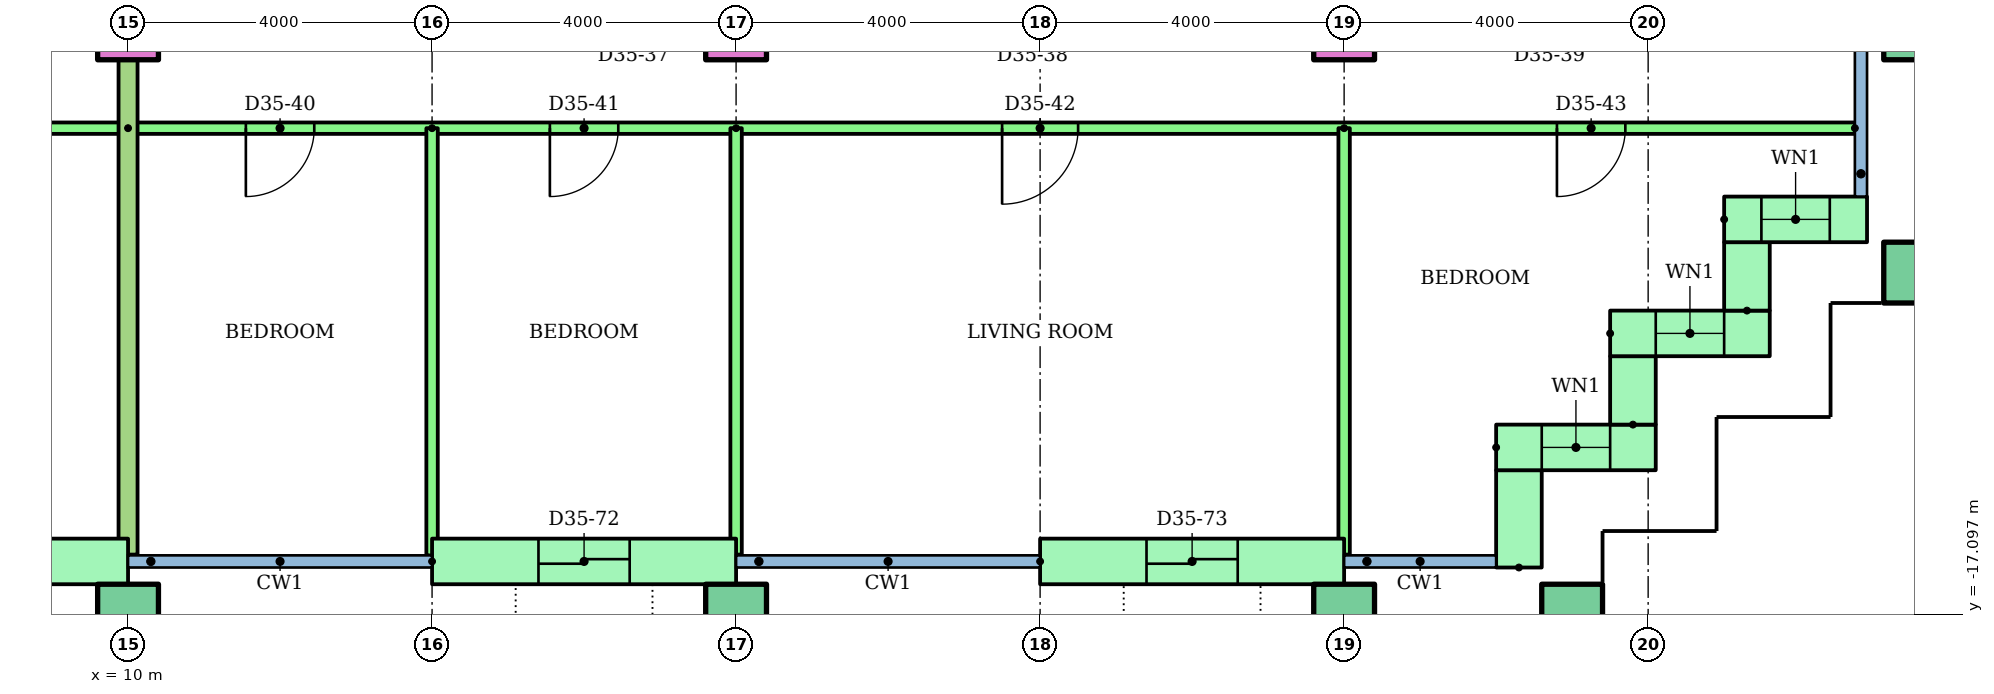
"""IFC4 building model, lengths in metres.
Left out: names, types, materials, properties, quantities, classifications, styles, units other than length and angle.
Written with IfcOpenShell. Run it as: python <this file> out.ifc"""

import sys

from ifc_helpers import new_model, si_unit, direction, frame, frame_2d, origin, origin_2d, place, context, subcontext, project, spatial, rectangle, hollow_rectangle, extrude, element, fill, save


model = new_model("IFC4")
c1 = context("Model", 3, precision=1e-05, world=origin(), true_north=direction((0.0, 1.0)))
c2 = subcontext(c1, "Body", "Model", "MODEL_VIEW")
j1 = project(units=[si_unit("LENGTHUNIT", "METRE"), si_unit("PLANEANGLEUNIT", "RADIAN")], contexts=[c1])
p1 = place(None, origin())
s1 = spatial("IfcSite", under=j1, at=p1, CompositionType="ELEMENT")
p2 = place(p1, origin())
s2 = spatial("IfcBuilding", under=s1, at=p2, CompositionType="ELEMENT")
p3 = place(p2, frame((0.0, 0.0, 135.8)))
s3 = spatial("IfcBuildingStorey", under=s2, at=p3, CompositionType="ELEMENT", Elevation=135.8)
for number, where in (
    (1, (10.0, -17.1, 0.0)),
    (2, (18.0, -17.1, 0.0)),
    (3, (26.0, -17.1, 0.0)),
    (4, (29.0, -17.1, 0.0)),
    (5, (33.5, -12.6, 0.0)),
):
    element("IfcColumn", number, at=place(p3, frame(where)), inside=s3, PredefinedType="COLUMN", context=c2, shape_type="SweptSolid", body=[
        extrude(hollow_rectangle(XDim=0.8, YDim=0.8, WallThickness=0.04, at=origin_2d()), origin(), (0.0, 0.0, 1.0), 3.2),
    ])
for number, where in (
    (6, (10.0, -9.4, 0.0)),
    (7, (18.0, -9.4, 0.0)),
    (8, (26.0, -9.4, 0.0)),
):
    element("IfcColumn", number, at=place(p3, frame(where)), inside=s3, PredefinedType="COLUMN", context=c2, shape_type="SweptSolid", body=[
        extrude(rectangle(XDim=0.8, YDim=0.8, at=origin_2d()), origin(), (0.0, 0.0, 1.0), 3.2),
    ])
p4 = place(p3, frame((33.5, -9.4, 0.0)))
e9 = element("IfcColumn", 9, at=p4, inside=s3, PredefinedType="COLUMN", context=c2, shape_type="SweptSolid", body=[
    extrude(hollow_rectangle(XDim=0.8, YDim=0.8, WallThickness=0.04, at=origin_2d()), origin(), (0.0, 0.0, 1.0), 3.2),
])
p5 = place(p3, frame((6.0, -16.4, 0.0)))
e10 = element("IfcWall", 10, at=p5, inside=s3, PredefinedType="STANDARD", context=c2, shape_type="SweptSolid", body=[
    extrude(rectangle(XDim=4.0, YDim=0.6, at=frame_2d((2.0, 0.0))), origin(), (0.0, 0.0, 1.0), 2.92),
])
p6 = place(p5, frame((1.4, 0.0, 0.0)))
e11 = element("IfcOpeningElement", 11, at=p6, cuts=e10, PredefinedType="OPENING", context=c2, shape_type="SweptSolid", body=[
    extrude(rectangle(XDim=1.2, YDim=2.1, at=frame_2d((0.6, 1.05))), frame((0.0, 0.31, 0.0), z_axis=(0.0, -1.0, 0.0), x_axis=(1.0, 0.0, 0.0)), (0.0, 0.0, 1.0), 0.62),
])
p7 = place(p3, frame((14.0, -16.4, 0.0)))
e12 = element("IfcWall", 12, at=p7, inside=s3, PredefinedType="STANDARD", context=c2, shape_type="SweptSolid", body=[
    extrude(rectangle(XDim=4.0, YDim=0.6, at=frame_2d((2.0, 0.0))), origin(), (0.0, 0.0, 1.0), 2.92),
])
p8 = place(p7, frame((1.4, 0.0, 0.0)))
e13 = element("IfcOpeningElement", 13, at=p8, cuts=e12, PredefinedType="OPENING", context=c2, shape_type="SweptSolid", body=[
    extrude(rectangle(XDim=1.2, YDim=2.1, at=frame_2d((0.6, 1.05))), frame((0.0, 0.31, 0.0), z_axis=(0.0, -1.0, 0.0), x_axis=(1.0, 0.0, 0.0)), (0.0, 0.0, 1.0), 0.62),
])
p9 = place(p3, frame((22.0, -16.4, 0.0)))
e14 = element("IfcWall", 14, at=p9, inside=s3, PredefinedType="STANDARD", context=c2, shape_type="SweptSolid", body=[
    extrude(rectangle(XDim=4.0, YDim=0.6, at=frame_2d((2.0, 0.0))), origin(), (0.0, 0.0, 1.0), 2.92),
])
p10 = place(p9, frame((1.4, 0.0, 0.0)))
e15 = element("IfcOpeningElement", 15, at=p10, cuts=e14, PredefinedType="OPENING", context=c2, shape_type="SweptSolid", body=[
    extrude(rectangle(XDim=1.2, YDim=2.1, at=frame_2d((0.6, 1.05))), frame((0.0, 0.31, 0.0), z_axis=(0.0, -1.0, 0.0), x_axis=(1.0, 0.0, 0.0)), (0.0, 0.0, 1.0), 0.62),
])
p11 = place(p3, frame((28.3, -16.48, 0.0), z_axis=(0.0, 0.0, 1.0), x_axis=(0.0, 1.0, 0.0)))
e16 = element("IfcWall", 16, at=p11, inside=s3, PredefinedType="STANDARD", context=c2, shape_type="SweptSolid", body=[
    extrude(rectangle(XDim=1.28, YDim=0.6, at=frame_2d((0.64, 0.0))), origin(), (0.0, 0.0, 1.0), 2.92),
])
p12 = place(p3, frame((28.0, -14.9, 0.0)))
e17 = element("IfcWall", 17, at=p12, inside=s3, PredefinedType="STANDARD", context=c2, shape_type="SweptSolid", body=[
    extrude(rectangle(XDim=2.1, YDim=0.6, at=frame_2d((1.05, 0.0))), origin(), (0.0, 0.0, 1.0), 2.92),
])
p13 = place(p12, frame((0.6, 0.0, 0.9)))
e18 = element("IfcOpeningElement", 18, at=p13, cuts=e17, PredefinedType="OPENING", context=c2, shape_type="SweptSolid", body=[
    extrude(rectangle(XDim=0.9, YDim=1.5, at=frame_2d((0.45, 0.75))), frame((0.0, 0.31, 0.0), z_axis=(0.0, -1.0, 0.0), x_axis=(1.0, 0.0, 0.0)), (0.0, 0.0, 1.0), 0.62),
])
p14 = place(p3, frame((29.8, -14.6, 0.0), z_axis=(0.0, 0.0, 1.0), x_axis=(0.0, 1.0, 0.0)))
e19 = element("IfcWall", 19, at=p14, inside=s3, PredefinedType="STANDARD", context=c2, shape_type="SweptSolid", body=[
    extrude(rectangle(XDim=0.9, YDim=0.6, at=frame_2d((0.45, 0.0))), origin(), (0.0, 0.0, 1.0), 2.92),
])
p15 = place(p3, frame((29.5, -13.4, 0.0)))
e20 = element("IfcWall", 20, at=p15, inside=s3, PredefinedType="STANDARD", context=c2, shape_type="SweptSolid", body=[
    extrude(rectangle(XDim=2.1, YDim=0.6, at=frame_2d((1.05, 0.0))), origin(), (0.0, 0.0, 1.0), 2.92),
])
p16 = place(p15, frame((0.6, 0.0, 0.9)))
e21 = element("IfcOpeningElement", 21, at=p16, cuts=e20, PredefinedType="OPENING", context=c2, shape_type="SweptSolid", body=[
    extrude(rectangle(XDim=0.9, YDim=1.5, at=frame_2d((0.45, 0.75))), frame((0.0, 0.31, 0.0), z_axis=(0.0, -1.0, 0.0), x_axis=(1.0, 0.0, 0.0)), (0.0, 0.0, 1.0), 0.62),
])
p17 = place(p3, frame((31.3, -13.1, 0.0), z_axis=(0.0, 0.0, 1.0), x_axis=(0.0, 1.0, 0.0)))
e22 = element("IfcWall", 22, at=p17, inside=s3, PredefinedType="STANDARD", context=c2, shape_type="SweptSolid", body=[
    extrude(rectangle(XDim=0.9, YDim=0.6, at=frame_2d((0.45, 0.0))), origin(), (0.0, 0.0, 1.0), 2.92),
])
p18 = place(p3, frame((31.0, -11.9, 0.0)))
e23 = element("IfcWall", 23, at=p18, inside=s3, PredefinedType="STANDARD", context=c2, shape_type="SweptSolid", body=[
    extrude(rectangle(XDim=1.88, YDim=0.6, at=frame_2d((0.94, 0.0))), origin(), (0.0, 0.0, 1.0), 2.92),
])
p19 = place(p18, frame((0.49, 0.0, 0.9)))
e24 = element("IfcOpeningElement", 24, at=p19, cuts=e23, PredefinedType="OPENING", context=c2, shape_type="SweptSolid", body=[
    extrude(rectangle(XDim=0.9, YDim=1.5, at=frame_2d((0.45, 0.75))), frame((0.0, 0.31, 0.0), z_axis=(0.0, -1.0, 0.0), x_axis=(1.0, 0.0, 0.0)), (0.0, 0.0, 1.0), 0.62),
])
p20 = place(p3, frame((10.0, -10.7, 0.0), z_axis=(0.0, 0.0, 1.0), x_axis=(-1.0, 0.0, 0.0)))
e25 = element("IfcWall", 25, at=p20, inside=s3, PredefinedType="PARTITIONING", context=c2, shape_type="SweptSolid", body=[
    extrude(rectangle(XDim=16.0, YDim=0.15, at=frame_2d((8.0, 0.0))), origin(), (0.0, 0.0, 1.0), 2.4),
])
p21 = place(p20, frame((13.55, 0.0, 0.0)))
e26 = element("IfcOpeningElement", 26, at=p21, cuts=e25, PredefinedType="OPENING", context=c2, shape_type="SweptSolid", body=[
    extrude(rectangle(XDim=0.9, YDim=2.1, at=frame_2d((0.45, 1.05))), frame((0.0, 0.085, 0.0), z_axis=(0.0, -1.0, 0.0), x_axis=(1.0, 0.0, 0.0)), (0.0, 0.0, 1.0), 0.17),
])
p22 = place(p20, frame((9.55, 0.0, 0.0)))
e27 = element("IfcOpeningElement", 27, at=p22, cuts=e25, PredefinedType="OPENING", context=c2, shape_type="SweptSolid", body=[
    extrude(rectangle(XDim=0.9, YDim=2.1, at=frame_2d((0.45, 1.05))), frame((0.0, 0.085, 0.0), z_axis=(0.0, -1.0, 0.0), x_axis=(1.0, 0.0, 0.0)), (0.0, 0.0, 1.0), 0.17),
])
p23 = place(p20, frame((3.5, 0.0, 0.0)))
e28 = element("IfcOpeningElement", 28, at=p23, cuts=e25, PredefinedType="OPENING", context=c2, shape_type="SweptSolid", body=[
    extrude(rectangle(XDim=1.0, YDim=2.1, at=frame_2d((0.5, 1.05))), frame((0.0, 0.085, 0.0), z_axis=(0.0, -1.0, 0.0), x_axis=(1.0, 0.0, 0.0)), (0.0, 0.0, 1.0), 0.17),
])
p24 = place(p3, frame((32.72, -10.7, 0.0), z_axis=(0.0, 0.0, 1.0), x_axis=(-1.0, 0.0, 0.0)))
e29 = element("IfcWall", 29, at=p24, inside=s3, PredefinedType="PARTITIONING", context=c2, shape_type="SweptSolid", body=[
    extrude(rectangle(XDim=22.72, YDim=0.15, at=frame_2d((11.36, 0.0))), origin(), (0.0, 0.0, 1.0), 2.4),
])
p25 = place(p24, frame((20.27, 0.0, 0.0)))
e30 = element("IfcOpeningElement", 30, at=p25, cuts=e29, PredefinedType="OPENING", context=c2, shape_type="SweptSolid", body=[
    extrude(rectangle(XDim=0.9, YDim=2.1, at=frame_2d((0.45, 1.05))), frame((0.0, 0.085, 0.0), z_axis=(0.0, -1.0, 0.0), x_axis=(1.0, 0.0, 0.0)), (0.0, 0.0, 1.0), 0.17),
])
p26 = place(p24, frame((16.27, 0.0, 0.0)))
e31 = element("IfcOpeningElement", 31, at=p26, cuts=e29, PredefinedType="OPENING", context=c2, shape_type="SweptSolid", body=[
    extrude(rectangle(XDim=0.9, YDim=2.1, at=frame_2d((0.45, 1.05))), frame((0.0, 0.085, 0.0), z_axis=(0.0, -1.0, 0.0), x_axis=(1.0, 0.0, 0.0)), (0.0, 0.0, 1.0), 0.17),
])
p27 = place(p24, frame((10.22, 0.0, 0.0)))
e32 = element("IfcOpeningElement", 32, at=p27, cuts=e29, PredefinedType="OPENING", context=c2, shape_type="SweptSolid", body=[
    extrude(rectangle(XDim=1.0, YDim=2.1, at=frame_2d((0.5, 1.05))), frame((0.0, 0.085, 0.0), z_axis=(0.0, -1.0, 0.0), x_axis=(1.0, 0.0, 0.0)), (0.0, 0.0, 1.0), 0.17),
])
p28 = place(p24, frame((3.02, 0.0, 0.0)))
e33 = element("IfcOpeningElement", 33, at=p28, cuts=e29, PredefinedType="OPENING", context=c2, shape_type="SweptSolid", body=[
    extrude(rectangle(XDim=0.9, YDim=2.1, at=frame_2d((0.45, 1.05))), frame((0.0, 0.085, 0.0), z_axis=(0.0, -1.0, 0.0), x_axis=(1.0, 0.0, 0.0)), (0.0, 0.0, 1.0), 0.17),
])
p29 = place(p3, frame((14.0, -10.7, 0.0), z_axis=(0.0, 0.0, 1.0), x_axis=(0.0, -1.0, 0.0)))
e34 = element("IfcWall", 34, at=p29, inside=s3, PredefinedType="PARTITIONING", context=c2, shape_type="SweptSolid", body=[
    extrude(rectangle(XDim=5.621, YDim=0.15, at=frame_2d((2.811, 0.0))), origin(), (0.0, 0.0, 1.0), 2.4),
])
for number, where, z_axis, x_axis in (
    (35, (18.0, -10.7, 0.0), (0.0, 0.0, 1.0), (0.0, -1.0, 0.0)),
    (36, (26.0, -10.7, 0.0), (0.0, 0.0, 1.0), (0.0, -1.0, 0.0)),
):
    element("IfcWall", number, at=place(p3, frame(where, z_axis=z_axis, x_axis=x_axis)), inside=s3, PredefinedType="PARTITIONING", context=c2, shape_type="SweptSolid", body=[
        extrude(rectangle(XDim=5.61, YDim=0.15, at=frame_2d((2.805, 0.0))), origin(), (0.0, 0.0, 1.0), 2.4),
    ])
p30 = place(p3, frame((10.0, -1.4, 0.0), z_axis=(0.0, 0.0, 1.0), x_axis=(0.0, -1.0, 0.0)))
e37 = element("IfcWall", 37, at=p30, inside=s3, PredefinedType="PARTITIONING", context=c2, shape_type="SweptSolid", body=[
    extrude(rectangle(XDim=14.91, YDim=0.25, at=frame_2d((7.455, 0.0))), origin(), (0.0, 0.0, 1.0), 2.4),
])
p31 = place(p13, origin())
e38 = element("IfcWindow", 38, at=p31, inside=s3, PartitioningType="SINGLE_PANEL", PredefinedType="WINDOW", context=c2, shape_type="SweptSolid", body=[
    extrude(rectangle(XDim=0.9, YDim=1.5, at=frame_2d((0.45, 0.75))), frame((0.0, 0.03, 0.0), z_axis=(0.0, -1.0, 0.0), x_axis=(1.0, 0.0, 0.0)), (0.0, 0.0, 1.0), 0.06),
])
fill(e18, e38)
p32 = place(p16, origin())
e39 = element("IfcWindow", 39, at=p32, inside=s3, PartitioningType="SINGLE_PANEL", PredefinedType="WINDOW", context=c2, shape_type="SweptSolid", body=[
    extrude(rectangle(XDim=0.9, YDim=1.5, at=frame_2d((0.45, 0.75))), frame((0.0, 0.03, 0.0), z_axis=(0.0, -1.0, 0.0), x_axis=(1.0, 0.0, 0.0)), (0.0, 0.0, 1.0), 0.06),
])
fill(e21, e39)
p33 = place(p19, origin())
e40 = element("IfcWindow", 40, at=p33, inside=s3, PartitioningType="SINGLE_PANEL", PredefinedType="WINDOW", context=c2, shape_type="SweptSolid", body=[
    extrude(rectangle(XDim=0.9, YDim=1.5, at=frame_2d((0.45, 0.75))), frame((0.0, 0.03, 0.0), z_axis=(0.0, -1.0, 0.0), x_axis=(1.0, 0.0, 0.0)), (0.0, 0.0, 1.0), 0.06),
])
fill(e24, e40)
p34 = place(p25, origin())
e41 = element("IfcDoor", 41, at=p34, inside=s3, OperationType="SINGLE_SWING_RIGHT", PredefinedType="DOOR", context=c2, shape_type="SweptSolid", body=[
    extrude(rectangle(XDim=0.9, YDim=2.1, at=frame_2d((0.45, 1.05))), frame((0.0, 0.025, 0.0), z_axis=(0.0, -1.0, 0.0), x_axis=(1.0, 0.0, 0.0)), (0.0, 0.0, 1.0), 0.05),
])
fill(e30, e41)
p35 = place(p26, origin())
e42 = element("IfcDoor", 42, at=p35, inside=s3, OperationType="SINGLE_SWING_RIGHT", PredefinedType="DOOR", context=c2, shape_type="SweptSolid", body=[
    extrude(rectangle(XDim=0.9, YDim=2.1, at=frame_2d((0.45, 1.05))), frame((0.0, 0.025, 0.0), z_axis=(0.0, -1.0, 0.0), x_axis=(1.0, 0.0, 0.0)), (0.0, 0.0, 1.0), 0.05),
])
fill(e31, e42)
p36 = place(p27, origin())
e43 = element("IfcDoor", 43, at=p36, inside=s3, OperationType="SINGLE_SWING_RIGHT", PredefinedType="DOOR", context=c2, shape_type="SweptSolid", body=[
    extrude(rectangle(XDim=1.0, YDim=2.1, at=frame_2d((0.5, 1.05))), frame((0.0, 0.025, 0.0), z_axis=(0.0, -1.0, 0.0), x_axis=(1.0, 0.0, 0.0)), (0.0, 0.0, 1.0), 0.05),
])
fill(e32, e43)
p37 = place(p28, origin())
e44 = element("IfcDoor", 44, at=p37, inside=s3, OperationType="SINGLE_SWING_RIGHT", PredefinedType="DOOR", context=c2, shape_type="SweptSolid", body=[
    extrude(rectangle(XDim=0.9, YDim=2.1, at=frame_2d((0.45, 1.05))), frame((0.0, 0.025, 0.0), z_axis=(0.0, -1.0, 0.0), x_axis=(1.0, 0.0, 0.0)), (0.0, 0.0, 1.0), 0.05),
])
fill(e33, e44)
p38 = place(p8, origin())
e45 = element("IfcDoor", 45, at=p38, inside=s3, OperationType="SLIDING_TO_LEFT", PredefinedType="DOOR", context=c2, shape_type="SweptSolid", body=[
    extrude(rectangle(XDim=1.2, YDim=2.1, at=frame_2d((0.6, 1.05))), frame((0.0, 0.025, 0.0), z_axis=(0.0, -1.0, 0.0), x_axis=(1.0, 0.0, 0.0)), (0.0, 0.0, 1.0), 0.05),
])
fill(e13, e45)
p39 = place(p10, origin())
e46 = element("IfcDoor", 46, at=p39, inside=s3, OperationType="SLIDING_TO_LEFT", PredefinedType="DOOR", context=c2, shape_type="SweptSolid", body=[
    extrude(rectangle(XDim=1.2, YDim=2.1, at=frame_2d((0.6, 1.05))), frame((0.0, 0.025, 0.0), z_axis=(0.0, -1.0, 0.0), x_axis=(1.0, 0.0, 0.0)), (0.0, 0.0, 1.0), 0.05),
])
fill(e15, e46)
save(model, sys.argv[1])
